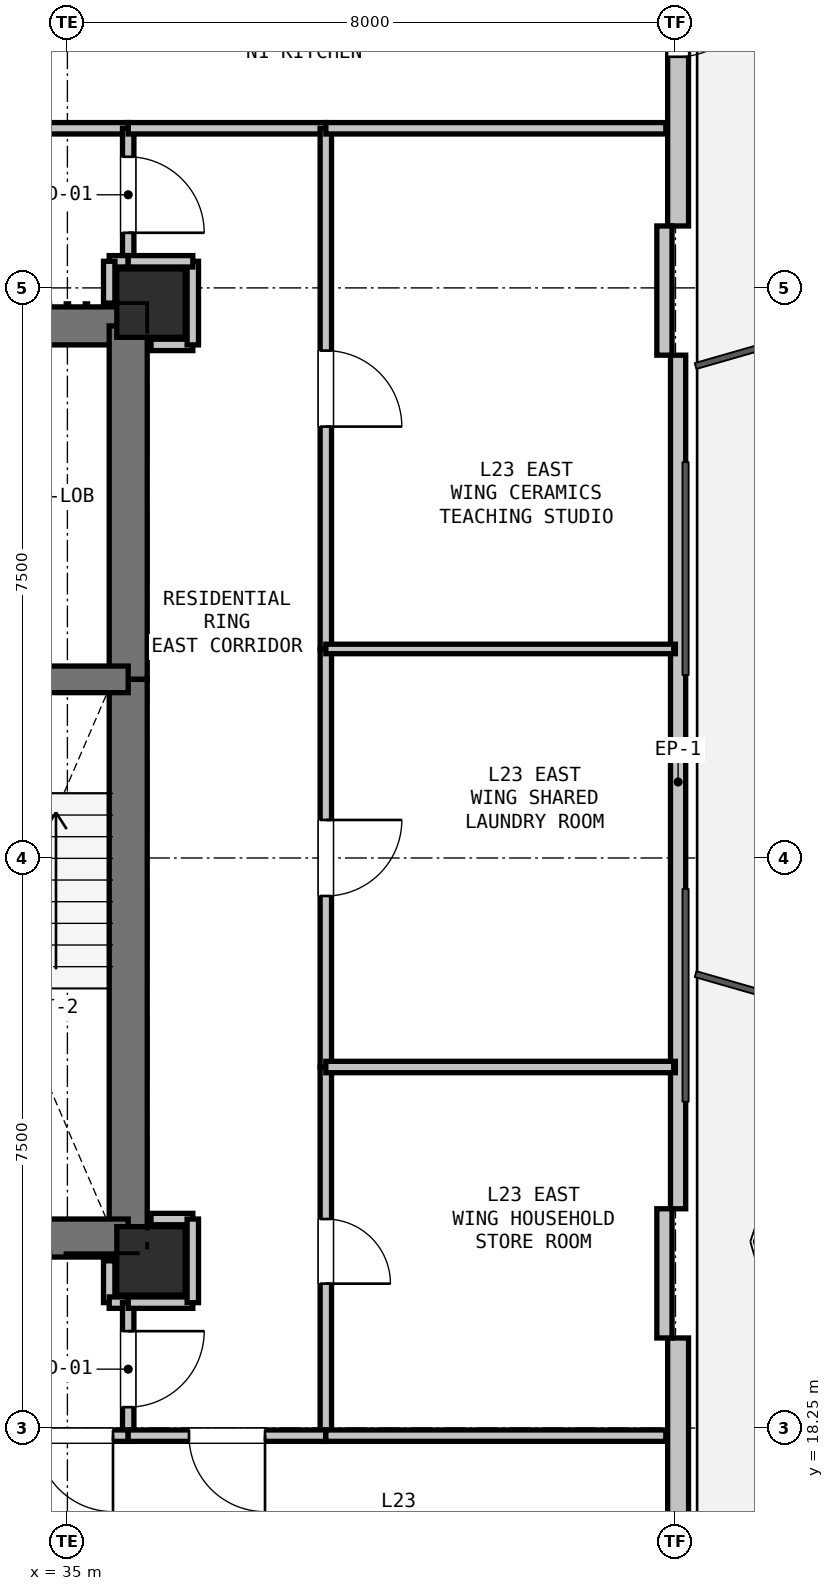
"""IFC4 building model, lengths in metres.
Left out: names, types, materials, properties, quantities, classifications, styles, units other than length and angle.
Written with IfcOpenShell. Run it as: python <this file> out.ifc"""

import sys

from ifc_helpers import new_model, si_unit, direction, frame, frame_2d, origin, origin_2d, place, context, subcontext, project, spatial, rectangle, extrude, element, fill, save


model = new_model("IFC4")
c1 = context("Model", 3, precision=1e-05, world=origin(), true_north=direction((0.0, 1.0)))
c2 = subcontext(c1, "Body", "Model", "MODEL_VIEW")
j1 = project(units=[si_unit("LENGTHUNIT", "METRE"), si_unit("PLANEANGLEUNIT", "RADIAN")], contexts=[c1])
p1 = place(None, origin())
s1 = spatial("IfcSite", under=j1, at=p1, CompositionType="ELEMENT")
p2 = place(p1, origin())
s2 = spatial("IfcBuilding", under=s1, at=p2, CompositionType="ELEMENT")
p3 = place(p2, frame((0.0, 0.0, 86.7)))
s3 = spatial("IfcBuildingStorey", under=s2, at=p3, CompositionType="ELEMENT", Elevation=86.7)
for number, where, z_axis, x_axis in (
    (1, (36.1, 33.05, 0.0), (0.0, 0.0, 1.0), (1.0, 0.0, 0.0)),
    (2, (36.1, 20.45, 0.0), (0.0, 0.0, 1.0), (1.0, 0.0, 0.0)),
):
    element("IfcColumn", number, at=place(p3, frame(where, z_axis=z_axis, x_axis=x_axis)), inside=s3, PredefinedType="COLUMN", context=c2, shape_type="SweptSolid", body=[
        extrude(rectangle(XDim=0.9, YDim=0.9, at=origin_2d()), origin(), (0.0, 0.0, 1.0), 3.3),
    ])
p4 = place(p3, frame((43.035, 45.994, 0.0), z_axis=(0.0, 0.0, 1.0), x_axis=(0.0, -1.0, 0.0)))
e3 = element("IfcWall", 3, at=p4, inside=s3, PredefinedType="SOLIDWALL", context=c2, shape_type="SweptSolid", body=[
    extrude(rectangle(XDim=11.93, YDim=0.275, at=frame_2d((5.965, 0.0))), origin(), (0.0, 0.0, 1.0), 2.67),
])
p5 = place(p4, frame((8.704, 0.0, 0.0)))
e4 = element("IfcOpeningElement", 4, at=p5, cuts=e3, PredefinedType="OPENING", context=c2, shape_type="SweptSolid", body=[
    extrude(rectangle(XDim=1.0, YDim=2.1, at=frame_2d((0.5, 1.05))), frame((0.0, 0.147, 0.0), z_axis=(0.0, -1.0, 0.0), x_axis=(1.0, 0.0, 0.0)), (0.0, 0.0, 1.0), 0.295),
])
p6 = place(p3, frame((43.035, 32.365, 0.0), z_axis=(0.0, 0.0, 1.0), x_axis=(0.0, -1.0, 0.0)))
e5 = element("IfcWall", 5, at=p6, inside=s3, PredefinedType="PARAPET", context=c2, shape_type="SweptSolid", body=[
    extrude(rectangle(XDim=11.229, YDim=0.2, at=frame_2d((5.615, 0.0))), origin(), (0.0, 0.0, 1.0), 0.2),
])
p7 = place(p3, frame((43.035, 19.435, 0.0), z_axis=(0.0, 0.0, 1.0), x_axis=(0.0, -1.0, 0.0)))
e6 = element("IfcWall", 6, at=p7, inside=s3, PredefinedType="SOLIDWALL", context=c2, shape_type="SweptSolid", body=[
    extrude(rectangle(XDim=11.93, YDim=0.275, at=frame_2d((5.965, 0.0))), origin(), (0.0, 0.0, 1.0), 2.67),
])
p8 = place(p7, frame((9.726, 0.0, 0.9)))
e7 = element("IfcOpeningElement", 7, at=p8, cuts=e6, PredefinedType="OPENING", context=c2, shape_type="SweptSolid", body=[
    extrude(rectangle(XDim=1.2, YDim=1.4, at=frame_2d((0.6, 0.7))), frame((0.0, 0.147, 0.0), z_axis=(0.0, -1.0, 0.0), x_axis=(1.0, 0.0, 0.0)), (0.0, 0.0, 1.0), 0.295),
])
for number, where, z_axis, x_axis in (
    (8, (42.854, 34.065, 0.0), (0.0, 0.0, 1.0), (0.0, -1.0, 0.0)),
    (9, (42.854, 21.135, 0.0), (0.0, 0.0, 1.0), (0.0, -1.0, 0.0)),
):
    element("IfcWall", number, at=place(p3, frame(where, z_axis=z_axis, x_axis=x_axis)), inside=s3, PredefinedType="PARAPET", context=c2, shape_type="SweptSolid", body=[
        extrude(rectangle(XDim=1.7, YDim=0.2, at=frame_2d((0.85, 0.0))), origin(), (0.0, 0.0, 1.0), 2.67),
    ])
p9 = place(p3, frame((32.35, 32.75, 0.0), z_axis=(0.0, 0.0, 1.0), x_axis=(1.0, 0.0, 0.0)))
e10 = element("IfcWall", 10, at=p9, inside=s3, PredefinedType="SHEAR", context=c2, shape_type="SweptSolid", body=[
    extrude(rectangle(XDim=3.45, YDim=0.5, at=frame_2d((1.725, 0.0))), origin(), (0.0, 0.0, 1.0), 3.05),
])
p10 = place(p9, frame((0.65, 0.0, 0.0)))
e11 = element("IfcOpeningElement", 11, at=p10, cuts=e10, PredefinedType="OPENING", context=c2, shape_type="SweptSolid", body=[
    extrude(rectangle(XDim=1.15, YDim=2.15, at=frame_2d((0.575, 1.075))), frame((0.0, 0.26, 0.0), z_axis=(0.0, -1.0, 0.0), x_axis=(1.0, 0.0, 0.0)), (0.0, 0.0, 1.0), 0.52),
])
p11 = place(p3, frame((35.8, 32.75, 0.0), z_axis=(0.0, 0.0, 1.0), x_axis=(0.0, -1.0, 0.0)))
e12 = element("IfcWall", 12, at=p11, inside=s3, PredefinedType="SHEAR", context=c2, shape_type="SweptSolid", body=[
    extrude(rectangle(XDim=4.65, YDim=0.5, at=frame_2d((2.325, 0.0))), origin(), (0.0, 0.0, 1.0), 3.05),
])
p12 = place(p3, frame((35.8, 28.1, 0.0), z_axis=(0.0, 0.0, 1.0), x_axis=(0.0, -1.0, 0.0)))
e13 = element("IfcWall", 13, at=p12, inside=s3, PredefinedType="SHEAR", context=c2, shape_type="SweptSolid", body=[
    extrude(rectangle(XDim=7.35, YDim=0.5, at=frame_2d((3.675, 0.0))), origin(), (0.0, 0.0, 1.0), 3.05),
])
p13 = place(p3, frame((35.8, 20.75, 0.0), z_axis=(0.0, 0.0, 1.0), x_axis=(-1.0, 0.0, 0.0)))
e14 = element("IfcWall", 14, at=p13, inside=s3, PredefinedType="SHEAR", context=c2, shape_type="SweptSolid", body=[
    extrude(rectangle(XDim=3.45, YDim=0.5, at=frame_2d((1.725, 0.0))), origin(), (0.0, 0.0, 1.0), 3.05),
])
p14 = place(p3, frame((32.35, 28.1, 0.0), z_axis=(0.0, 0.0, 1.0), x_axis=(1.0, 0.0, 0.0)))
e15 = element("IfcWall", 15, at=p14, inside=s3, PredefinedType="SHEAR", context=c2, shape_type="SweptSolid", body=[
    extrude(rectangle(XDim=3.45, YDim=0.35, at=frame_2d((1.725, 0.0))), origin(), (0.0, 0.0, 1.0), 3.05),
])
p15 = place(p14, frame((1.15, 0.0, 0.0)))
e16 = element("IfcOpeningElement", 16, at=p15, cuts=e15, PredefinedType="OPENING", context=c2, shape_type="SweptSolid", body=[
    extrude(rectangle(XDim=1.15, YDim=2.15, at=frame_2d((0.575, 1.075))), frame((0.0, 0.185, 0.0), z_axis=(0.0, -1.0, 0.0), x_axis=(1.0, 0.0, 0.0)), (0.0, 0.0, 1.0), 0.37),
])
p16 = place(p3, frame((35.55, 20.45, 0.0), z_axis=(0.0, 0.0, 1.0), x_axis=(0.0, -1.0, 0.0)))
e17 = element("IfcWall", 17, at=p16, inside=s3, PredefinedType="PARTITIONING", context=c2, shape_type="SweptSolid", body=[
    extrude(rectangle(XDim=0.55, YDim=0.15, at=frame_2d((0.275, 0.0))), origin(), (0.0, 0.0, 1.0), 2.498),
])
p17 = place(p3, frame((35.55, 19.9, 0.0), z_axis=(0.0, 0.0, 1.0), x_axis=(1.0, 0.0, 0.0)))
e18 = element("IfcWall", 18, at=p17, inside=s3, PredefinedType="PARTITIONING", context=c2, shape_type="SweptSolid", body=[
    extrude(rectangle(XDim=0.25, YDim=0.15, at=frame_2d((0.125, 0.0))), origin(), (0.0, 0.0, 1.0), 3.05),
])
p18 = place(p3, frame((35.8, 19.9, 0.0), z_axis=(0.0, 0.0, 1.0), x_axis=(0.0, -1.0, 0.0)))
e19 = element("IfcWall", 19, at=p18, inside=s3, PredefinedType="PARTITIONING", context=c2, shape_type="SweptSolid", body=[
    extrude(rectangle(XDim=1.75, YDim=0.15, at=frame_2d((0.875, 0.0))), origin(), (0.0, 0.0, 1.0), 3.05),
])
p19 = place(p18, frame((0.375, 0.0, 0.0)))
e20 = element("IfcOpeningElement", 20, at=p19, cuts=e19, PredefinedType="OPENING", context=c2, shape_type="SweptSolid", body=[
    extrude(rectangle(XDim=1.0, YDim=2.15, at=frame_2d((0.5, 1.075))), frame((0.0, 0.085, 0.0), z_axis=(0.0, -1.0, 0.0), x_axis=(1.0, 0.0, 0.0)), (0.0, 0.0, 1.0), 0.17),
])
p20 = place(p3, frame((35.8, 18.15, 0.0), z_axis=(0.0, 0.0, 1.0), x_axis=(-1.0, 0.0, 0.0)))
e21 = element("IfcWall", 21, at=p20, inside=s3, PredefinedType="PARTITIONING", context=c2, shape_type="SweptSolid", body=[
    extrude(rectangle(XDim=1.4, YDim=0.15, at=frame_2d((0.7, 0.0))), origin(), (0.0, 0.0, 1.0), 3.05),
])
p21 = place(p20, frame((0.2, 0.0, 0.0)))
e22 = element("IfcOpeningElement", 22, at=p21, cuts=e21, PredefinedType="OPENING", context=c2, shape_type="SweptSolid", body=[
    extrude(rectangle(XDim=1.0, YDim=2.15, at=frame_2d((0.5, 1.075))), frame((0.0, 0.085, 0.0), z_axis=(0.0, -1.0, 0.0), x_axis=(1.0, 0.0, 0.0)), (0.0, 0.0, 1.0), 0.17),
])
p22 = place(p3, frame((33.2, 35.35, 0.0), z_axis=(0.0, 0.0, 1.0), x_axis=(1.0, 0.0, 0.0)))
e23 = element("IfcWall", 23, at=p22, inside=s3, PredefinedType="PARTITIONING", context=c2, shape_type="SweptSolid", body=[
    extrude(rectangle(XDim=2.6, YDim=0.15, at=frame_2d((1.3, 0.0))), origin(), (0.0, 0.0, 1.0), 3.05),
])
p23 = place(p3, frame((35.8, 35.35, 0.0), z_axis=(0.0, 0.0, 1.0), x_axis=(0.0, -1.0, 0.0)))
e24 = element("IfcWall", 24, at=p23, inside=s3, PredefinedType="PARTITIONING", context=c2, shape_type="SweptSolid", body=[
    extrude(rectangle(XDim=1.75, YDim=0.15, at=frame_2d((0.875, 0.0))), origin(), (0.0, 0.0, 1.0), 3.05),
])
p24 = place(p23, frame((0.375, 0.0, 0.0)))
e25 = element("IfcOpeningElement", 25, at=p24, cuts=e24, PredefinedType="OPENING", context=c2, shape_type="SweptSolid", body=[
    extrude(rectangle(XDim=1.0, YDim=2.15, at=frame_2d((0.5, 1.075))), frame((0.0, 0.085, 0.0), z_axis=(0.0, -1.0, 0.0), x_axis=(1.0, 0.0, 0.0)), (0.0, 0.0, 1.0), 0.17),
])
p25 = place(p3, frame((35.8, 33.6, 0.0), z_axis=(0.0, 0.0, 1.0), x_axis=(-1.0, 0.0, 0.0)))
e26 = element("IfcWall", 26, at=p25, inside=s3, PredefinedType="PARTITIONING", context=c2, shape_type="SweptSolid", body=[
    extrude(rectangle(XDim=0.25, YDim=0.15, at=frame_2d((0.125, 0.0))), origin(), (0.0, 0.0, 1.0), 3.05),
])
p26 = place(p3, frame((35.55, 33.6, 0.0), z_axis=(0.0, 0.0, 1.0), x_axis=(0.0, -1.0, 0.0)))
e27 = element("IfcWall", 27, at=p26, inside=s3, PredefinedType="PARTITIONING", context=c2, shape_type="SweptSolid", body=[
    extrude(rectangle(XDim=0.55, YDim=0.15, at=frame_2d((0.275, 0.0))), origin(), (0.0, 0.0, 1.0), 2.498),
])
for number, where, z_axis, x_axis in (
    (28, (36.65, 21.0, 0.0), (0.0, 0.0, 1.0), (-1.0, 0.0, 0.0)),
    (29, (36.1, 32.5, 0.0), (0.0, 0.0, 1.0), (1.0, 0.0, 0.0)),
):
    element("IfcWall", number, at=place(p3, frame(where, z_axis=z_axis, x_axis=x_axis)), inside=s3, PredefinedType="PARTITIONING", context=c2, shape_type="SweptSolid", body=[
        extrude(rectangle(XDim=0.55, YDim=0.15, at=frame_2d((0.275, 0.0))), origin(), (0.0, 0.0, 1.0), 2.498),
    ])
p27 = place(p3, frame((36.65, 32.5, 0.0), z_axis=(0.0, 0.0, 1.0), x_axis=(0.0, 1.0, 0.0)))
e30 = element("IfcWall", 30, at=p27, inside=s3, PredefinedType="PARTITIONING", context=c2, shape_type="SweptSolid", body=[
    extrude(rectangle(XDim=1.1, YDim=0.15, at=frame_2d((0.55, 0.0))), origin(), (0.0, 0.0, 1.0), 2.423),
])
p28 = place(p3, frame((36.65, 33.6, 0.0), z_axis=(0.0, 0.0, 1.0), x_axis=(-1.0, 0.0, 0.0)))
e31 = element("IfcWall", 31, at=p28, inside=s3, PredefinedType="PARTITIONING", context=c2, shape_type="SweptSolid", body=[
    extrude(rectangle(XDim=0.85, YDim=0.15, at=frame_2d((0.425, 0.0))), origin(), (0.0, 0.0, 1.0), 2.423),
])
p29 = place(p3, frame((35.8, 35.35, 0.0), z_axis=(0.0, 0.0, 1.0), x_axis=(1.0, 0.0, 0.0)))
e32 = element("IfcWall", 32, at=p29, inside=s3, PredefinedType="PARTITIONING", context=c2, shape_type="SweptSolid", body=[
    extrude(rectangle(XDim=2.6, YDim=0.15, at=frame_2d((1.3, 0.0))), origin(), (0.0, 0.0, 1.0), 2.423),
])
p30 = place(p3, frame((38.4, 35.35, 0.0), z_axis=(0.0, 0.0, 1.0), x_axis=(0.0, -1.0, 0.0)))
e33 = element("IfcWall", 33, at=p30, inside=s3, PredefinedType="PARTITIONING", context=c2, shape_type="SweptSolid", body=[
    extrude(rectangle(XDim=6.85, YDim=0.15, at=frame_2d((3.425, 0.0))), origin(), (0.0, 0.0, 1.0), 3.05),
])
p31 = place(p30, frame((2.925, 0.0, 0.0)))
e34 = element("IfcOpeningElement", 34, at=p31, cuts=e33, PredefinedType="OPENING", context=c2, shape_type="SweptSolid", body=[
    extrude(rectangle(XDim=1.0, YDim=2.15, at=frame_2d((0.5, 1.075))), frame((0.0, 0.085, 0.0), z_axis=(0.0, -1.0, 0.0), x_axis=(1.0, 0.0, 0.0)), (0.0, 0.0, 1.0), 0.17),
])
p32 = place(p3, frame((38.4, 28.5, 0.0), z_axis=(0.0, 0.0, 1.0), x_axis=(0.0, -1.0, 0.0)))
e35 = element("IfcWall", 35, at=p32, inside=s3, PredefinedType="PARTITIONING", context=c2, shape_type="SweptSolid", body=[
    extrude(rectangle(XDim=5.5, YDim=0.15, at=frame_2d((2.75, 0.0))), origin(), (0.0, 0.0, 1.0), 3.05),
])
p33 = place(p32, frame((2.25, 0.0, 0.0)))
e36 = element("IfcOpeningElement", 36, at=p33, cuts=e35, PredefinedType="OPENING", context=c2, shape_type="SweptSolid", body=[
    extrude(rectangle(XDim=1.0, YDim=2.15, at=frame_2d((0.5, 1.075))), frame((0.0, 0.085, 0.0), z_axis=(0.0, -1.0, 0.0), x_axis=(1.0, 0.0, 0.0)), (0.0, 0.0, 1.0), 0.17),
])
p34 = place(p3, frame((38.4, 23.0, 0.0), z_axis=(0.0, 0.0, 1.0), x_axis=(0.0, -1.0, 0.0)))
e37 = element("IfcWall", 37, at=p34, inside=s3, PredefinedType="PARTITIONING", context=c2, shape_type="SweptSolid", body=[
    extrude(rectangle(XDim=4.85, YDim=0.15, at=frame_2d((2.425, 0.0))), origin(), (0.0, 0.0, 1.0), 3.05),
])
p35 = place(p34, frame((2.0, 0.0, 0.0)))
e38 = element("IfcOpeningElement", 38, at=p35, cuts=e37, PredefinedType="OPENING", context=c2, shape_type="SweptSolid", body=[
    extrude(rectangle(XDim=0.85, YDim=2.1, at=frame_2d((0.425, 1.05))), frame((0.0, 0.085, 0.0), z_axis=(0.0, -1.0, 0.0), x_axis=(1.0, 0.0, 0.0)), (0.0, 0.0, 1.0), 0.17),
])
p36 = place(p3, frame((38.4, 18.15, 0.0), z_axis=(0.0, 0.0, 1.0), x_axis=(-1.0, 0.0, 0.0)))
e39 = element("IfcWall", 39, at=p36, inside=s3, PredefinedType="PARTITIONING", context=c2, shape_type="SweptSolid", body=[
    extrude(rectangle(XDim=2.6, YDim=0.15, at=frame_2d((1.3, 0.0))), origin(), (0.0, 0.0, 1.0), 2.423),
])
p37 = place(p36, frame((0.8, 0.0, 0.0)))
e40 = element("IfcOpeningElement", 40, at=p37, cuts=e39, PredefinedType="OPENING", context=c2, shape_type="SweptSolid", body=[
    extrude(rectangle(XDim=1.0, YDim=2.15, at=frame_2d((0.5, 1.075))), frame((0.0, 0.085, 0.0), z_axis=(0.0, -1.0, 0.0), x_axis=(1.0, 0.0, 0.0)), (0.0, 0.0, 1.0), 0.17),
])
p38 = place(p3, frame((35.8, 19.9, 0.0), z_axis=(0.0, 0.0, 1.0), x_axis=(1.0, 0.0, 0.0)))
e41 = element("IfcWall", 41, at=p38, inside=s3, PredefinedType="PARTITIONING", context=c2, shape_type="SweptSolid", body=[
    extrude(rectangle(XDim=0.85, YDim=0.15, at=frame_2d((0.425, 0.0))), origin(), (0.0, 0.0, 1.0), 2.423),
])
p39 = place(p3, frame((36.65, 19.9, 0.0), z_axis=(0.0, 0.0, 1.0), x_axis=(0.0, 1.0, 0.0)))
e42 = element("IfcWall", 42, at=p39, inside=s3, PredefinedType="PARTITIONING", context=c2, shape_type="SweptSolid", body=[
    extrude(rectangle(XDim=1.1, YDim=0.15, at=frame_2d((0.55, 0.0))), origin(), (0.0, 0.0, 1.0), 3.05),
])
for number, where, z_axis, x_axis in (
    (43, (42.873, 35.35, 0.0), (0.0, 0.0, 1.0), (-1.0, 0.0, 0.0)),
    (44, (38.4, 18.15, 0.0), (0.0, 0.0, 1.0), (1.0, 0.0, 0.0)),
):
    element("IfcWall", number, at=place(p3, frame(where, z_axis=z_axis, x_axis=x_axis)), inside=s3, PredefinedType="PARTITIONING", context=c2, shape_type="SweptSolid", body=[
        extrude(rectangle(XDim=4.473, YDim=0.15, at=frame_2d((2.237, 0.0))), origin(), (0.0, 0.0, 1.0), 2.365),
    ])
p40 = place(p3, frame((42.999, 28.5, 0.0), z_axis=(0.0, 0.0, 1.0), x_axis=(-1.0, 0.0, 0.0)))
e45 = element("IfcWall", 45, at=p40, inside=s3, PredefinedType="PARTITIONING", context=c2, shape_type="SweptSolid", body=[
    extrude(rectangle(XDim=4.599, YDim=0.125, at=frame_2d((2.299, 0.0))), origin(), (0.0, 0.0, 1.0), 2.365),
])
p41 = place(p3, frame((42.999, 23.0, 0.0), z_axis=(0.0, 0.0, 1.0), x_axis=(-1.0, 0.0, 0.0)))
e46 = element("IfcWall", 46, at=p41, inside=s3, PredefinedType="PARTITIONING", context=c2, shape_type="SweptSolid", body=[
    extrude(rectangle(XDim=4.599, YDim=0.15, at=frame_2d((2.299, 0.0))), origin(), (0.0, 0.0, 1.0), 2.365),
])
p42 = place(p5, origin())
e47 = element("IfcDoor", 47, at=p42, inside=s3, OperationType="SINGLE_SWING_LEFT", PredefinedType="DOOR", context=c2, shape_type="SweptSolid", body=[
    extrude(rectangle(XDim=1.0, YDim=2.1, at=frame_2d((0.5, 1.05))), frame((0.0, 0.025, 0.0), z_axis=(0.0, -1.0, 0.0), x_axis=(1.0, 0.0, 0.0)), (0.0, 0.0, 1.0), 0.05),
])
fill(e4, e47)
p43 = place(p19, origin())
e48 = element("IfcDoor", 48, at=p43, inside=s3, OperationType="SINGLE_SWING_LEFT", PredefinedType="DOOR", context=c2, shape_type="SweptSolid", body=[
    extrude(rectangle(XDim=1.0, YDim=2.15, at=frame_2d((0.5, 1.075))), frame((0.0, 0.025, 0.0), z_axis=(0.0, -1.0, 0.0), x_axis=(1.0, 0.0, 0.0)), (0.0, 0.0, 1.0), 0.05),
])
fill(e20, e48)
p44 = place(p24, origin())
e49 = element("IfcDoor", 49, at=p44, inside=s3, OperationType="SINGLE_SWING_RIGHT", PredefinedType="DOOR", context=c2, shape_type="SweptSolid", body=[
    extrude(rectangle(XDim=1.0, YDim=2.15, at=frame_2d((0.5, 1.075))), frame((0.0, 0.025, 0.0), z_axis=(0.0, -1.0, 0.0), x_axis=(1.0, 0.0, 0.0)), (0.0, 0.0, 1.0), 0.05),
])
fill(e25, e49)
p45 = place(p21, origin())
e50 = element("IfcDoor", 50, at=p45, inside=s3, OperationType="SINGLE_SWING_LEFT", PredefinedType="DOOR", context=c2, shape_type="SweptSolid", body=[
    extrude(rectangle(XDim=1.0, YDim=2.15, at=frame_2d((0.5, 1.075))), frame((0.0, 0.025, 0.0), z_axis=(0.0, -1.0, 0.0), x_axis=(1.0, 0.0, 0.0)), (0.0, 0.0, 1.0), 0.05),
])
fill(e22, e50)
p46 = place(p37, origin())
e51 = element("IfcDoor", 51, at=p46, inside=s3, OperationType="SINGLE_SWING_LEFT", PredefinedType="DOOR", context=c2, shape_type="SweptSolid", body=[
    extrude(rectangle(XDim=1.0, YDim=2.15, at=frame_2d((0.5, 1.075))), frame((0.0, 0.025, 0.0), z_axis=(0.0, -1.0, 0.0), x_axis=(1.0, 0.0, 0.0)), (0.0, 0.0, 1.0), 0.05),
])
fill(e40, e51)
p47 = place(p31, origin())
e52 = element("IfcDoor", 52, at=p47, inside=s3, OperationType="SINGLE_SWING_RIGHT", PredefinedType="DOOR", context=c2, shape_type="SweptSolid", body=[
    extrude(rectangle(XDim=1.0, YDim=2.15, at=frame_2d((0.5, 1.075))), frame((0.0, 0.025, 0.0), z_axis=(0.0, -1.0, 0.0), x_axis=(1.0, 0.0, 0.0)), (0.0, 0.0, 1.0), 0.05),
])
fill(e34, e52)
p48 = place(p33, origin())
e53 = element("IfcDoor", 53, at=p48, inside=s3, OperationType="SINGLE_SWING_LEFT", PredefinedType="DOOR", context=c2, shape_type="SweptSolid", body=[
    extrude(rectangle(XDim=1.0, YDim=2.15, at=frame_2d((0.5, 1.075))), frame((0.0, 0.025, 0.0), z_axis=(0.0, -1.0, 0.0), x_axis=(1.0, 0.0, 0.0)), (0.0, 0.0, 1.0), 0.05),
])
fill(e36, e53)
p49 = place(p35, origin())
e54 = element("IfcDoor", 54, at=p49, inside=s3, OperationType="SINGLE_SWING_RIGHT", PredefinedType="DOOR", context=c2, shape_type="SweptSolid", body=[
    extrude(rectangle(XDim=0.85, YDim=2.1, at=frame_2d((0.425, 1.05))), frame((0.0, 0.025, 0.0), z_axis=(0.0, -1.0, 0.0), x_axis=(1.0, 0.0, 0.0)), (0.0, 0.0, 1.0), 0.05),
])
fill(e38, e54)
save(model, sys.argv[1])
